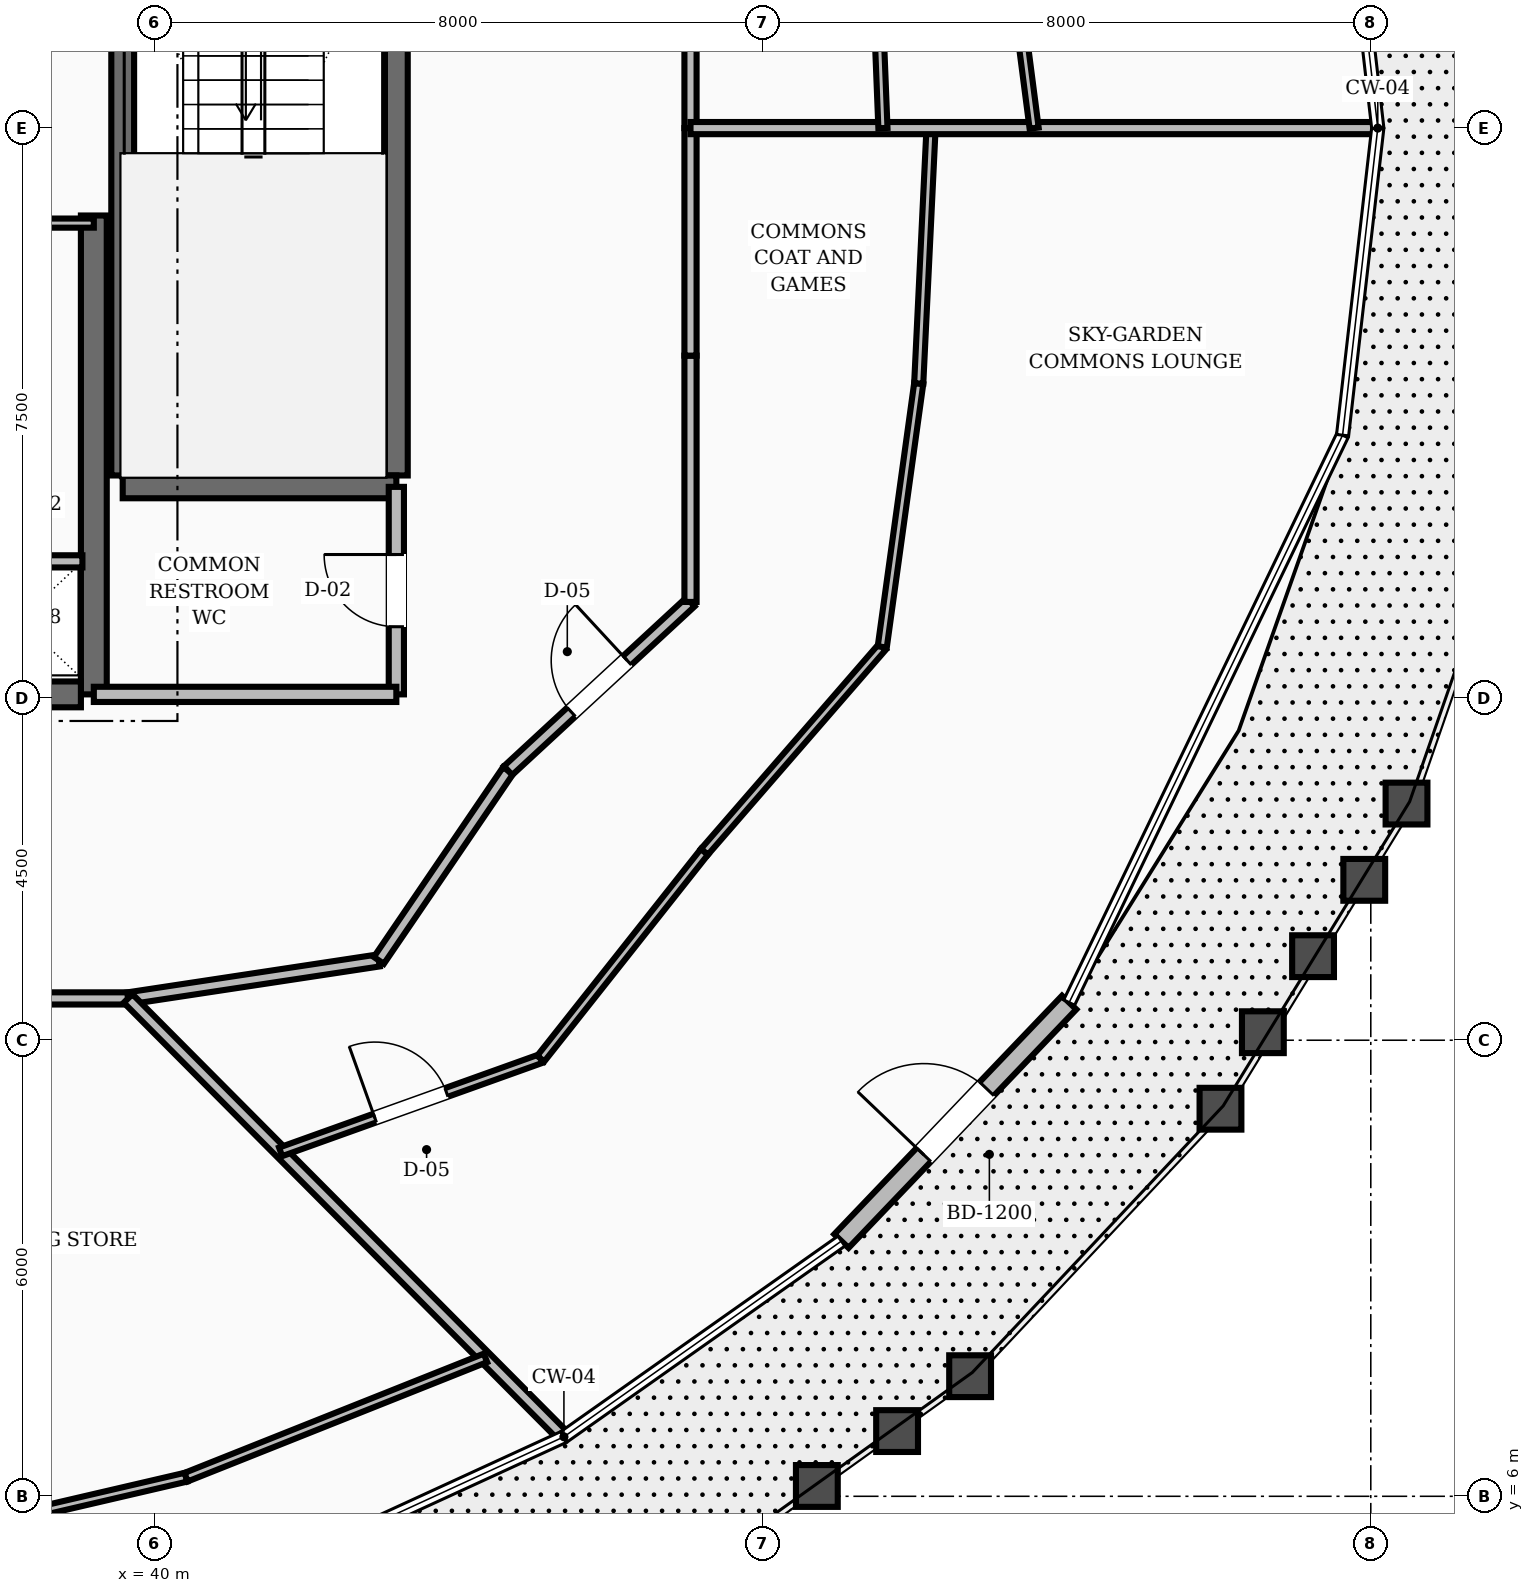
"""IFC4 building model, lengths in metres.
Left out: names, types, materials, properties, quantities, classifications, styles, units other than length and angle.
Written with IfcOpenShell. Run it as: python <this file> out.ifc"""

import sys

from ifc_helpers import new_model, si_unit, direction, frame, frame_2d, origin, place, context, subcontext, project, spatial, rectangle, extrude, element, fill, save


model = new_model("IFC4")
c1 = context("Model", 3, precision=1e-05, world=origin(), true_north=direction((0.0, 1.0)))
c2 = subcontext(c1, "Body", "Model", "MODEL_VIEW")
j1 = project(units=[si_unit("LENGTHUNIT", "METRE"), si_unit("PLANEANGLEUNIT", "RADIAN")], contexts=[c1])
p1 = place(None, origin())
s1 = spatial("IfcSite", under=j1, at=p1, CompositionType="ELEMENT")
p2 = place(p1, origin())
s2 = spatial("IfcBuilding", under=s1, at=p2, CompositionType="ELEMENT")
p3 = place(p2, frame((0.0, 0.0, 196.4)))
s3 = spatial("IfcBuildingStorey", under=s2, at=p3, CompositionType="ELEMENT", Elevation=196.4)
p4 = place(p3, frame((39.2, 16.55, 0.0), z_axis=(0.0, 0.0, 1.0), x_axis=(0.0, 1.0, 0.0)))
e1 = element("IfcWall", 1, at=p4, inside=s3, PredefinedType="SHEAR", context=c2, shape_type="SweptSolid", body=[
    extrude(rectangle(XDim=6.3, YDim=0.34, at=frame_2d((3.15, 0.0))), origin(), (0.0, 0.0, 1.0), 3.6),
])
p5 = place(p3, frame((35.8, 16.55, 0.0), z_axis=(0.0, 0.0, 1.0), x_axis=(1.0, 0.0, 0.0)))
e2 = element("IfcWall", 2, at=p5, inside=s3, PredefinedType="SHEAR", context=c2, shape_type="SweptSolid", body=[
    extrude(rectangle(XDim=3.23, YDim=0.34, at=frame_2d((1.615, 0.0))), origin(), (0.0, 0.0, 1.0), 3.6),
])
p6 = place(p5, frame((0.3, 0.0, 0.0)))
e3 = element("IfcOpeningElement", 3, at=p6, cuts=e2, PredefinedType="OPENING", context=c2, shape_type="SweptSolid", body=[
    extrude(rectangle(XDim=1.1, YDim=2.1, at=frame_2d((0.55, 1.05))), frame((0.0, 0.18, 0.0), z_axis=(0.0, -1.0, 0.0), x_axis=(1.0, 0.0, 0.0)), (0.0, 0.0, 1.0), 0.36),
])
for number, where, z_axis, x_axis in (
    (4, (43.18, 19.43, 0.0), (0.0, 0.0, 1.0), (0.0, 1.0, 0.0)),
    (5, (39.58, 19.43, 0.0), (0.0, 0.0, 1.0), (0.0, 1.0, 0.0)),
):
    element("IfcWall", number, at=place(p3, frame(where, z_axis=z_axis, x_axis=x_axis)), inside=s3, PredefinedType="SHEAR", context=c2, shape_type="SweptSolid", body=[
        extrude(rectangle(XDim=8.74, YDim=0.3, at=frame_2d((4.37, 0.0))), origin(), (0.0, 0.0, 1.0), 3.6),
    ])
p7 = place(p3, frame((39.58, 19.28, 0.0), z_axis=(0.0, 0.0, 1.0), x_axis=(1.0, 0.0, 0.0)))
e6 = element("IfcWall", 6, at=p7, inside=s3, PredefinedType="SHEAR", context=c2, shape_type="SweptSolid", body=[
    extrude(rectangle(XDim=3.6, YDim=0.3, at=frame_2d((1.8, 0.0))), origin(), (0.0, 0.0, 1.0), 3.6),
])
p8 = place(p3, frame((49.035, 9.358, 0.0), z_axis=(0.0, 0.0, 1.0), x_axis=(0.690600199346, 0.723236727955, 0.0)))
e7 = element("IfcWall", 7, at=p8, inside=s3, PredefinedType="STANDARD", context=c2, shape_type="SweptSolid", body=[
    extrude(rectangle(XDim=4.339, YDim=0.26, at=frame_2d((2.169, 0.0))), origin(), (0.0, 0.0, 1.0), 2.82),
])
p9 = place(p8, frame((1.569, 0.0, 0.0)))
e8 = element("IfcOpeningElement", 8, at=p9, cuts=e7, PredefinedType="OPENING", context=c2, shape_type="SweptSolid", body=[
    extrude(rectangle(XDim=1.2, YDim=2.15, at=frame_2d((0.6, 1.075))), frame((0.0, 0.14, 0.0), z_axis=(0.0, -1.0, 0.0), x_axis=(1.0, 0.0, 0.0)), (0.0, 0.0, 1.0), 0.28),
])
p10 = place(p3, frame((43.18, 16.55, 0.0), z_axis=(0.0, 0.0, 1.0), x_axis=(0.0, 1.0, 0.0)))
e9 = element("IfcWall", 9, at=p10, inside=s3, PredefinedType="SOLIDWALL", context=c2, shape_type="SweptSolid", body=[
    extrude(rectangle(XDim=2.73, YDim=0.2, at=frame_2d((1.365, 0.0))), origin(), (0.0, 0.0, 1.0), 2.8),
])
p11 = place(p10, frame((0.89, 0.0, 0.0)))
e10 = element("IfcOpeningElement", 10, at=p11, cuts=e9, PredefinedType="OPENING", context=c2, shape_type="SweptSolid", body=[
    extrude(rectangle(XDim=0.95, YDim=2.1, at=frame_2d((0.475, 1.05))), frame((0.0, 0.11, 0.0), z_axis=(0.0, -1.0, 0.0), x_axis=(1.0, 0.0, 0.0)), (0.0, 0.0, 1.0), 0.22),
])
p12 = place(p3, frame((39.2, 16.55, 0.0), z_axis=(0.0, 0.0, 1.0), x_axis=(1.0, 0.0, 0.0)))
e11 = element("IfcWall", 11, at=p12, inside=s3, PredefinedType="SOLIDWALL", context=c2, shape_type="SweptSolid", body=[
    extrude(rectangle(XDim=3.98, YDim=0.2, at=frame_2d((1.99, 0.0))), origin(), (0.0, 0.0, 1.0), 2.8),
])
p13 = place(p3, frame((37.4, 18.3, 0.0), z_axis=(0.0, 0.0, 1.0), x_axis=(1.0, 0.0, 0.0)))
e12 = element("IfcWall", 12, at=p13, inside=s3, PredefinedType="SOLIDWALL", context=c2, shape_type="SweptSolid", body=[
    extrude(rectangle(XDim=1.65, YDim=0.16, at=frame_2d((0.825, 0.0))), origin(), (0.0, 0.0, 1.0), 2.8),
])
p14 = place(p3, frame((37.4, 22.75, 0.0), z_axis=(0.0, 0.0, 1.0), x_axis=(1.0, 0.0, 0.0)))
e13 = element("IfcWall", 13, at=p14, inside=s3, PredefinedType="PARTITIONING", context=c2, shape_type="SweptSolid", body=[
    extrude(rectangle(XDim=1.8, YDim=0.12, at=frame_2d((0.9, 0.0))), origin(), (0.0, 0.0, 1.0), 2.8),
])
p15 = place(p3, frame((47.05, 24.0, 0.0), z_axis=(0.0, 0.0, 1.0), x_axis=(0.0, 1.0, 0.0)))
e14 = element("IfcWall", 14, at=p15, inside=s3, PredefinedType="SOLIDWALL", context=c2, shape_type="SweptSolid", body=[
    extrude(rectangle(XDim=2.994, YDim=0.16, at=frame_2d((1.497, 0.0))), origin(), (0.0, 0.0, 1.0), 2.8),
])
p16 = place(p3, frame((36.743, 12.55, 0.0), z_axis=(0.0, 0.0, 1.0), x_axis=(1.0, 0.0, 0.0)))
e15 = element("IfcWall", 15, at=p16, inside=s3, PredefinedType="SOLIDWALL", context=c2, shape_type="SweptSolid", body=[
    extrude(rectangle(XDim=2.908, YDim=0.16, at=frame_2d((1.454, 0.0))), origin(), (0.0, 0.0, 1.0), 2.8),
])
p17 = place(p3, frame((39.651, 12.55, 0.0), z_axis=(0.0, 0.0, 1.0), x_axis=(0.988710906508, 0.149835721217, 0.0)))
e16 = element("IfcWall", 16, at=p17, inside=s3, PredefinedType="SOLIDWALL", context=c2, shape_type="SweptSolid", body=[
    extrude(rectangle(XDim=3.337, YDim=0.16, at=frame_2d((1.668, 0.0))), origin(), (0.0, 0.0, 1.0), 2.8),
])
p18 = place(p3, frame((42.95, 13.05, 0.0), z_axis=(0.0, 0.0, 1.0), x_axis=(0.562674669208, 0.826678423955, 0.0)))
e17 = element("IfcWall", 17, at=p18, inside=s3, PredefinedType="SOLIDWALL", context=c2, shape_type="SweptSolid", body=[
    extrude(rectangle(XDim=3.021, YDim=0.16, at=frame_2d((1.511, 0.0))), origin(), (0.0, 0.0, 1.0), 2.8),
])
p19 = place(p3, frame((44.65, 15.548, 0.0), z_axis=(0.0, 0.0, 1.0), x_axis=(0.734347936521, 0.678773237633, 0.0)))
e18 = element("IfcWall", 18, at=p19, inside=s3, PredefinedType="SOLIDWALL", context=c2, shape_type="SweptSolid", body=[
    extrude(rectangle(XDim=3.268, YDim=0.16, at=frame_2d((1.634, 0.0))), origin(), (0.0, 0.0, 1.0), 2.8),
])
p20 = place(p19, frame((1.134, 0.0, 0.0)))
e19 = element("IfcOpeningElement", 19, at=p20, cuts=e18, PredefinedType="OPENING", context=c2, shape_type="SweptSolid", body=[
    extrude(rectangle(XDim=1.0, YDim=2.1, at=frame_2d((0.5, 1.05))), frame((0.0, 0.09, 0.0), z_axis=(0.0, -1.0, 0.0), x_axis=(1.0, 0.0, 0.0)), (0.0, 0.0, 1.0), 0.18),
])
p21 = place(p3, frame((47.05, 17.766, 0.0), z_axis=(0.0, 0.0, 1.0), x_axis=(0.0, 1.0, 0.0)))
e20 = element("IfcWall", 20, at=p21, inside=s3, PredefinedType="SOLIDWALL", context=c2, shape_type="SweptSolid", body=[
    extrude(rectangle(XDim=3.24, YDim=0.16, at=frame_2d((1.62, 0.0))), origin(), (0.0, 0.0, 1.0), 2.8),
])
p22 = place(p3, frame((47.05, 21.006, 0.0), z_axis=(0.0, 0.0, 1.0), x_axis=(0.0, 1.0, 0.0)))
e21 = element("IfcWall", 21, at=p22, inside=s3, PredefinedType="SOLIDWALL", context=c2, shape_type="SweptSolid", body=[
    extrude(rectangle(XDim=2.994, YDim=0.16, at=frame_2d((1.497, 0.0))), origin(), (0.0, 0.0, 1.0), 2.8),
])
p23 = place(p3, frame((39.651, 12.55, 0.0), z_axis=(0.0, 0.0, 1.0), x_axis=(0.705049844298, -0.709157751882, 0.0)))
e22 = element("IfcWall", 22, at=p23, inside=s3, PredefinedType="SOLIDWALL", context=c2, shape_type="SweptSolid", body=[
    extrude(rectangle(XDim=8.083, YDim=0.16, at=frame_2d((4.042, 0.0))), origin(), (0.0, 0.0, 1.0), 2.8),
])
p24 = place(p3, frame((41.657, 10.531, 0.0), z_axis=(0.0, 0.0, 1.0), x_axis=(0.941388902833, 0.337323188681, 0.0)))
e23 = element("IfcWall", 23, at=p24, inside=s3, PredefinedType="PARTITIONING", context=c2, shape_type="SweptSolid", body=[
    extrude(rectangle(XDim=3.635, YDim=0.12, at=frame_2d((1.818, 0.0))), origin(), (0.0, 0.0, 1.0), 2.8),
])
p25 = place(p24, frame((1.318, 0.0, 0.0)))
e24 = element("IfcOpeningElement", 24, at=p25, cuts=e23, PredefinedType="OPENING", context=c2, shape_type="SweptSolid", body=[
    extrude(rectangle(XDim=1.0, YDim=2.1, at=frame_2d((0.5, 1.05))), frame((0.0, 0.07, 0.0), z_axis=(0.0, -1.0, 0.0), x_axis=(1.0, 0.0, 0.0)), (0.0, 0.0, 1.0), 0.14),
])
p26 = place(p3, frame((45.08, 11.758, 0.0), z_axis=(0.0, 0.0, 1.0), x_axis=(0.620585820478, 0.78413853331, 0.0)))
e25 = element("IfcWall", 25, at=p26, inside=s3, PredefinedType="PARTITIONING", context=c2, shape_type="SweptSolid", body=[
    extrude(rectangle(XDim=3.471, YDim=0.12, at=frame_2d((1.735, 0.0))), origin(), (0.0, 0.0, 1.0), 2.8),
])
p27 = place(p3, frame((47.234, 14.479, 0.0), z_axis=(0.0, 0.0, 1.0), x_axis=(0.655438258218, 0.755248760121, 0.0)))
e26 = element("IfcWall", 26, at=p27, inside=s3, PredefinedType="PARTITIONING", context=c2, shape_type="SweptSolid", body=[
    extrude(rectangle(XDim=3.569, YDim=0.12, at=frame_2d((1.784, 0.0))), origin(), (0.0, 0.0, 1.0), 2.8),
])
p28 = place(p3, frame((49.573, 17.175, 0.0), z_axis=(0.0, 0.0, 1.0), x_axis=(0.137121457215, 0.990554241812, 0.0)))
e27 = element("IfcWall", 27, at=p28, inside=s3, PredefinedType="PARTITIONING", context=c2, shape_type="SweptSolid", body=[
    extrude(rectangle(XDim=3.499, YDim=0.12, at=frame_2d((1.749, 0.0))), origin(), (0.0, 0.0, 1.0), 2.8),
])
p29 = place(p3, frame((50.052, 20.64, 0.0), z_axis=(0.0, 0.0, 1.0), x_axis=(0.048192738589, 0.998838054915, 0.0)))
e28 = element("IfcWall", 28, at=p29, inside=s3, PredefinedType="PARTITIONING", context=c2, shape_type="SweptSolid", body=[
    extrude(rectangle(XDim=3.364, YDim=0.12, at=frame_2d((1.682, 0.0))), origin(), (0.0, 0.0, 1.0), 2.8),
])
p30 = place(p3, frame((47.05, 24.0, 0.0), z_axis=(0.0, 0.0, 1.0), x_axis=(1.0, 0.0, 0.0)))
e29 = element("IfcWall", 29, at=p30, inside=s3, PredefinedType="SOLIDWALL", context=c2, shape_type="SweptSolid", body=[
    extrude(rectangle(XDim=8.992, YDim=0.16, at=frame_2d((4.496, 0.0))), origin(), (0.0, 0.0, 1.0), 2.8),
])
p31 = place(p3, frame((49.582, 24.0, 0.0), z_axis=(0.0, 0.0, 1.0), x_axis=(-0.03941371276, 0.999222977741, 0.0)))
e30 = element("IfcWall", 30, at=p31, inside=s3, PredefinedType="PARTITIONING", context=c2, shape_type="SweptSolid", body=[
    extrude(rectangle(XDim=3.289, YDim=0.12, at=frame_2d((1.645, 0.0))), origin(), (0.0, 0.0, 1.0), 2.8),
])
p32 = place(p3, frame((51.571, 24.0, 0.0), z_axis=(0.0, 0.0, 1.0), x_axis=(-0.128428201462, 0.991718809476, 0.0)))
e31 = element("IfcWall", 31, at=p32, inside=s3, PredefinedType="PARTITIONING", context=c2, shape_type="SweptSolid", body=[
    extrude(rectangle(XDim=7.138, YDim=0.12, at=frame_2d((3.569, 0.0))), origin(), (0.0, 0.0, 1.0), 2.8),
])
p33 = place(p32, frame((4.262, 0.0, 0.0)))
e32 = element("IfcOpeningElement", 32, at=p33, cuts=e31, PredefinedType="OPENING", context=c2, shape_type="SweptSolid", body=[
    extrude(rectangle(XDim=0.95, YDim=2.1, at=frame_2d((0.475, 1.05))), frame((0.0, 0.07, 0.0), z_axis=(0.0, -1.0, 0.0), x_axis=(1.0, 0.0, 0.0)), (0.0, 0.0, 1.0), 0.14),
])
p34 = place(p3, frame((36.264, 5.285, 0.0), z_axis=(0.0, 0.0, 1.0), x_axis=(0.973957731006, 0.226729658877, 0.0)))
e33 = element("IfcWall", 33, at=p34, inside=s3, PredefinedType="PARTITIONING", context=c2, shape_type="SweptSolid", body=[
    extrude(rectangle(XDim=4.261, YDim=0.12, at=frame_2d((2.13, 0.0))), origin(), (0.0, 0.0, 1.0), 2.8),
])
p35 = place(p3, frame((40.414, 6.251, 0.0), z_axis=(0.0, 0.0, 1.0), x_axis=(0.928976219059, 0.370139412144, 0.0)))
e34 = element("IfcWall", 34, at=p35, inside=s3, PredefinedType="PARTITIONING", context=c2, shape_type="SweptSolid", body=[
    extrude(rectangle(XDim=4.24, YDim=0.12, at=frame_2d((2.12, 0.0))), origin(), (0.0, 0.0, 1.0), 2.8),
])
p36 = place(p9, origin())
e35 = element("IfcDoor", 35, at=p36, inside=s3, OperationType="SINGLE_SWING_LEFT", PredefinedType="DOOR", context=c2, shape_type="SweptSolid", body=[
    extrude(rectangle(XDim=1.2, YDim=2.15, at=frame_2d((0.6, 1.075))), frame((0.0, 0.025, 0.0), z_axis=(0.0, -1.0, 0.0), x_axis=(1.0, 0.0, 0.0)), (0.0, 0.0, 1.0), 0.05),
])
fill(e8, e35)
p37 = place(p11, origin())
e36 = element("IfcDoor", 36, at=p37, inside=s3, OperationType="SINGLE_SWING_RIGHT", PredefinedType="DOOR", context=c2, shape_type="SweptSolid", body=[
    extrude(rectangle(XDim=0.95, YDim=2.1, at=frame_2d((0.475, 1.05))), frame((0.0, 0.025, 0.0), z_axis=(0.0, -1.0, 0.0), x_axis=(1.0, 0.0, 0.0)), (0.0, 0.0, 1.0), 0.05),
])
fill(e10, e36)
p38 = place(p20, origin())
e37 = element("IfcDoor", 37, at=p38, inside=s3, OperationType="SINGLE_SWING_RIGHT", PredefinedType="DOOR", context=c2, shape_type="SweptSolid", body=[
    extrude(rectangle(XDim=1.0, YDim=2.1, at=frame_2d((0.5, 1.05))), frame((0.0, 0.025, 0.0), z_axis=(0.0, -1.0, 0.0), x_axis=(1.0, 0.0, 0.0)), (0.0, 0.0, 1.0), 0.05),
])
fill(e19, e37)
p39 = place(p25, origin())
e38 = element("IfcDoor", 38, at=p39, inside=s3, OperationType="SINGLE_SWING_LEFT", PredefinedType="DOOR", context=c2, shape_type="SweptSolid", body=[
    extrude(rectangle(XDim=1.0, YDim=2.1, at=frame_2d((0.5, 1.05))), frame((0.0, 0.025, 0.0), z_axis=(0.0, -1.0, 0.0), x_axis=(1.0, 0.0, 0.0)), (0.0, 0.0, 1.0), 0.05),
])
fill(e24, e38)
save(model, sys.argv[1])
